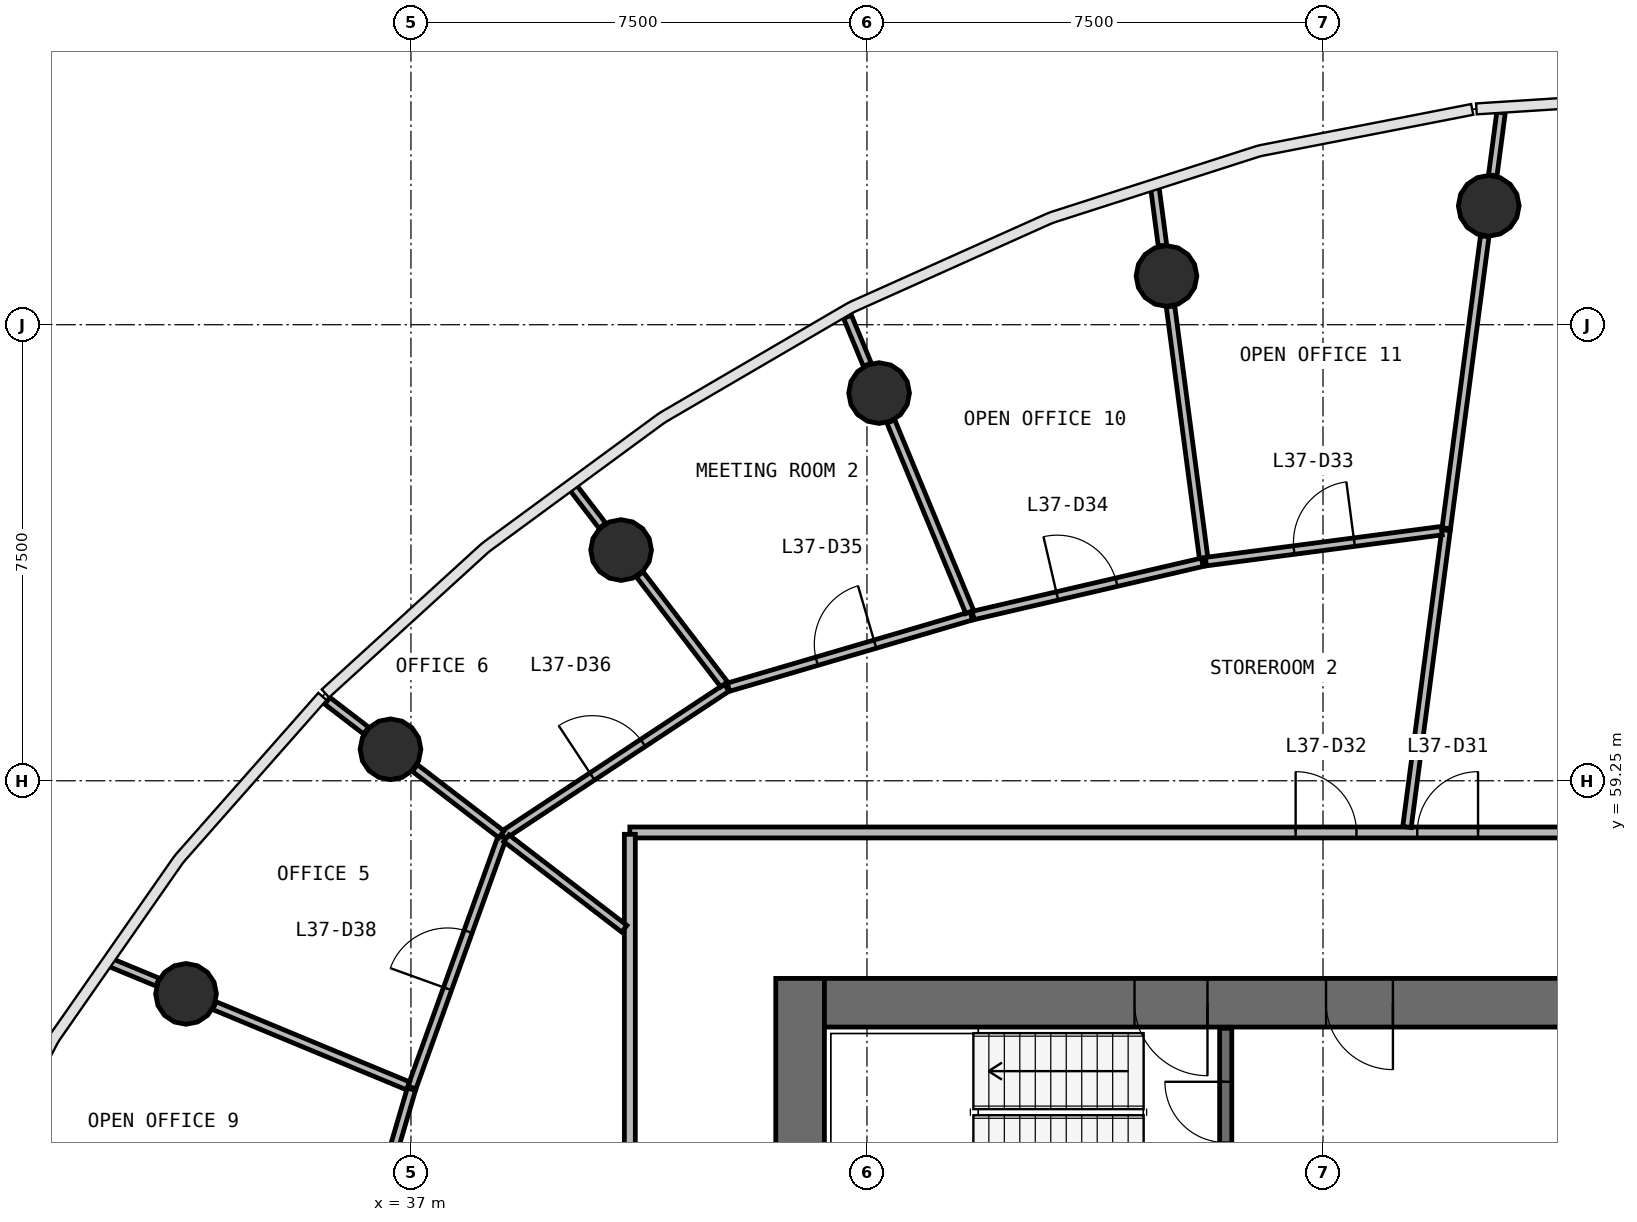
"""IFC4 building model, lengths in metres.
Left out: names, types, materials, properties, quantities, classifications, styles, units other than length and angle.
Written with IfcOpenShell. Run it as: python <this file> out.ifc"""

import sys

from ifc_helpers import new_model, si_unit, direction, frame, frame_2d, origin, origin_2d, place, context, subcontext, project, spatial, rectangle, circle, extrude, source, transform, mapped, element, fill, save


model = new_model("IFC4")
c1 = context("Model", 3, precision=1e-05, world=origin(), true_north=direction((0.0, 1.0)))
c2 = subcontext(c1, "Body", "Model", "MODEL_VIEW")
j1 = project(units=[si_unit("LENGTHUNIT", "METRE"), si_unit("PLANEANGLEUNIT", "RADIAN")], contexts=[c1])
p1 = place(None, origin())
s1 = spatial("IfcSite", under=j1, at=p1, CompositionType="ELEMENT")
p2 = place(p1, origin())
s2 = spatial("IfcBuilding", under=s1, at=p2, CompositionType="ELEMENT")
p3 = place(p2, frame((0.0, 0.0, 156.5)))
s3 = spatial("IfcBuildingStorey", under=s2, at=p3, CompositionType="ELEMENT", Elevation=156.5)
p4 = place(p3, frame((43.4, 56.0, 0.0), z_axis=(0.0, 0.0, 1.0), x_axis=(0.0, -1.0, 0.0)))
e1 = element("IfcWall", 1, at=p4, inside=s3, PredefinedType="SHEAR", context=c2, shape_type="SweptSolid", body=[
    extrude(rectangle(XDim=16.0, YDim=0.8, at=frame_2d((8.0, 0.0))), origin(), (0.0, 0.0, 1.0), 3.9),
])
p5 = place(p4, frame((7.1, 0.0, 0.0)))
e2 = element("IfcOpeningElement", 2, at=p5, cuts=e1, PredefinedType="OPENING", context=c2, shape_type="SweptSolid", body=[
    extrude(rectangle(XDim=1.8, YDim=2.1, at=frame_2d((0.9, 1.05))), frame((0.0, 0.41, 0.0), z_axis=(0.0, -1.0, 0.0), x_axis=(1.0, 0.0, 0.0)), (0.0, 0.0, 1.0), 0.82),
])
p6 = place(p3, frame((60.2, 55.6, 0.0), z_axis=(0.0, 0.0, 1.0), x_axis=(-1.0, 0.0, 0.0)))
e3 = element("IfcWall", 3, at=p6, inside=s3, PredefinedType="SHEAR", context=c2, shape_type="SweptSolid", body=[
    extrude(rectangle(XDim=16.4, YDim=0.8, at=frame_2d((8.2, 0.0))), origin(), (0.0, 0.0, 1.0), 3.9),
])
p7 = place(p6, frame((0.2, 0.0, 0.0)))
e4 = element("IfcOpeningElement", 4, at=p7, cuts=e3, PredefinedType="OPENING", context=c2, shape_type="SweptSolid", body=[
    extrude(rectangle(XDim=1.1, YDim=2.1, at=frame_2d((0.55, 1.05))), frame((0.0, 0.41, 0.0), z_axis=(0.0, -1.0, 0.0), x_axis=(1.0, 0.0, 0.0)), (0.0, 0.0, 1.0), 0.82),
])
p8 = place(p6, frame((10.1, 0.0, 0.0)))
e5 = element("IfcOpeningElement", 5, at=p8, cuts=e3, PredefinedType="OPENING", context=c2, shape_type="SweptSolid", body=[
    extrude(rectangle(XDim=1.2, YDim=2.1, at=frame_2d((0.6, 1.05))), frame((0.0, 0.41, 0.0), z_axis=(0.0, -1.0, 0.0), x_axis=(1.0, 0.0, 0.0)), (0.0, 0.0, 1.0), 0.82),
])
p9 = place(p6, frame((7.05, 0.0, 0.0)))
e6 = element("IfcOpeningElement", 6, at=p9, cuts=e3, PredefinedType="OPENING", context=c2, shape_type="SweptSolid", body=[
    extrude(rectangle(XDim=1.1, YDim=2.1, at=frame_2d((0.55, 1.05))), frame((0.0, 0.41, 0.0), z_axis=(0.0, -1.0, 0.0), x_axis=(1.0, 0.0, 0.0)), (0.0, 0.0, 1.0), 0.82),
])
m1 = source(origin(), c2, "Body", "SweptSolid", [
    extrude(circle(Radius=0.5, at=origin_2d()), origin(), (0.0, 0.0, 1.0), 3.9),
])
for number, where, z_axis, x_axis in (
    (7, (54.726, 68.705, 0.0), (0.0, 0.0, 1.0), (1.0, 0.0, 0.0)),
    (8, (49.426, 67.551, 0.0), (0.0, 0.0, 1.0), (1.0, 0.0, 0.0)),
    (9, (44.699, 65.626, 0.0), (0.0, 0.0, 1.0), (1.0, 0.0, 0.0)),
    (10, (40.456, 63.044, 0.0), (0.0, 0.0, 1.0), (1.0, 0.0, 0.0)),
    (11, (36.664, 59.768, 0.0), (0.0, 0.0, 1.0), (1.0, 0.0, 0.0)),
    (12, (33.301, 55.746, 0.0), (0.0, 0.0, 1.0), (1.0, 0.0, 0.0)),
):
    element("IfcColumn", number, at=place(p3, frame(where, z_axis=z_axis, x_axis=x_axis)), inside=s3, PredefinedType="COLUMN", context=c2, shape_type="MappedRepresentation", body=[
        mapped(m1, transform((0.0, 0.0, 0.0), scale=1.0)),
    ])
p10 = place(p3, frame((50.4, 52.43, 0.0), z_axis=(0.0, 0.0, 1.0), x_axis=(0.0, 1.0, 0.0)))
e13 = element("IfcWall", 13, at=p10, inside=s3, PredefinedType="SOLIDWALL", context=c2, shape_type="SweptSolid", body=[
    extrude(rectangle(XDim=2.75, YDim=0.2, at=frame_2d((1.375, 0.0))), origin(), (0.0, 0.0, 1.0), 3.58),
])
p11 = place(p10, frame((0.87, 0.0, 0.0)))
e14 = element("IfcOpeningElement", 14, at=p11, cuts=e13, PredefinedType="OPENING", context=c2, shape_type="SweptSolid", body=[
    extrude(rectangle(XDim=1.0, YDim=2.1, at=frame_2d((0.5, 1.05))), frame((0.0, 0.11, 0.0), z_axis=(0.0, -1.0, 0.0), x_axis=(1.0, 0.0, 0.0)), (0.0, 0.0, 1.0), 0.22),
])
p12 = place(p3, frame((40.6, 58.4, 0.0), z_axis=(0.0, 0.0, 1.0), x_axis=(1.0, 0.0, 0.0)))
e15 = element("IfcWall", 15, at=p12, inside=s3, PredefinedType="PARTITIONING", context=c2, shape_type="SweptSolid", body=[
    extrude(rectangle(XDim=22.8, YDim=0.18, at=frame_2d((11.4, 0.0))), origin(), (0.0, 0.0, 1.0), 2.88),
])
p13 = place(p12, frame((12.95, 0.0, 0.0)))
e16 = element("IfcOpeningElement", 16, at=p13, cuts=e15, PredefinedType="OPENING", context=c2, shape_type="SweptSolid", body=[
    extrude(rectangle(XDim=1.0, YDim=2.1, at=frame_2d((0.5, 1.05))), frame((0.0, 0.1, 0.0), z_axis=(0.0, -1.0, 0.0), x_axis=(1.0, 0.0, 0.0)), (0.0, 0.0, 1.0), 0.2),
])
p14 = place(p12, frame((10.95, 0.0, 0.0)))
e17 = element("IfcOpeningElement", 17, at=p14, cuts=e15, PredefinedType="OPENING", context=c2, shape_type="SweptSolid", body=[
    extrude(rectangle(XDim=1.0, YDim=2.1, at=frame_2d((0.5, 1.05))), frame((0.0, 0.1, 0.0), z_axis=(0.0, -1.0, 0.0), x_axis=(1.0, 0.0, 0.0)), (0.0, 0.0, 1.0), 0.2),
])
p15 = place(p3, frame((40.6, 37.63, 0.0), z_axis=(0.0, 0.0, 1.0), x_axis=(0.0, 1.0, 0.0)))
e18 = element("IfcWall", 18, at=p15, inside=s3, PredefinedType="PARTITIONING", context=c2, shape_type="SweptSolid", body=[
    extrude(rectangle(XDim=20.74, YDim=0.18, at=frame_2d((10.37, 0.0))), origin(), (0.0, 0.0, 1.0), 2.88),
])
p16 = place(p15, frame((9.89, 0.0, 0.0)))
e19 = element("IfcOpeningElement", 19, at=p16, cuts=e18, PredefinedType="OPENING", context=c2, shape_type="SweptSolid", body=[
    extrude(rectangle(XDim=1.0, YDim=2.1, at=frame_2d((0.5, 1.05))), frame((0.0, 0.1, 0.0), z_axis=(0.0, -1.0, 0.0), x_axis=(1.0, 0.0, 0.0)), (0.0, 0.0, 1.0), 0.2),
])
p17 = place(p15, frame((4.29, 0.0, 0.0)))
e20 = element("IfcOpeningElement", 20, at=p17, cuts=e18, PredefinedType="OPENING", context=c2, shape_type="SweptSolid", body=[
    extrude(rectangle(XDim=1.0, YDim=2.1, at=frame_2d((0.5, 1.05))), frame((0.0, 0.1, 0.0), z_axis=(0.0, -1.0, 0.0), x_axis=(1.0, 0.0, 0.0)), (0.0, 0.0, 1.0), 0.2),
])
p18 = place(p3, frame((53.381, 58.49, 0.0), z_axis=(0.0, 0.0, 1.0), x_axis=(0.130523758186, 0.991445181817, 0.0)))
e21 = element("IfcWall", 21, at=p18, inside=s3, PredefinedType="PARTITIONING", context=c2, shape_type="SweptSolid", body=[
    extrude(rectangle(XDim=4.925, YDim=0.14, at=frame_2d((2.462, 0.0))), origin(), (0.0, 0.0, 1.0), 2.88),
])
p19 = place(p3, frame((54.028, 63.402, 0.0), z_axis=(0.0, 0.0, 1.0), x_axis=(0.130532734851, 0.991443999998, 0.0)))
e22 = element("IfcWall", 22, at=p19, inside=s3, PredefinedType="PARTITIONING", context=c2, shape_type="SweptSolid", body=[
    extrude(rectangle(XDim=4.844, YDim=0.14, at=frame_2d((2.422, 0.0))), origin(), (0.0, 0.0, 1.0), 2.88),
])
p20 = place(p3, frame((38.511, 58.351, 0.0), z_axis=(0.0, 0.0, 1.0), x_axis=(0.834612459485, 0.550837582662, 0.0)))
e23 = element("IfcWall", 23, at=p20, inside=s3, PredefinedType="PARTITIONING", context=c2, shape_type="SweptSolid", body=[
    extrude(rectangle(XDim=4.412, YDim=0.14, at=frame_2d((2.206, 0.0))), origin(), (0.0, 0.0, 1.0), 2.88),
])
p21 = place(p20, frame((1.762, 0.0, 0.0)))
e24 = element("IfcOpeningElement", 24, at=p21, cuts=e23, PredefinedType="OPENING", context=c2, shape_type="SweptSolid", body=[
    extrude(rectangle(XDim=1.0, YDim=2.1, at=frame_2d((0.5, 1.05))), frame((0.0, 0.08, 0.0), z_axis=(0.0, -1.0, 0.0), x_axis=(1.0, 0.0, 0.0)), (0.0, 0.0, 1.0), 0.16),
])
p22 = place(p3, frame((37.016, 54.207, 0.0), z_axis=(0.0, 0.0, 1.0), x_axis=(0.339349662801, 0.940660303381, 0.0)))
e25 = element("IfcWall", 25, at=p22, inside=s3, PredefinedType="PARTITIONING", context=c2, shape_type="SweptSolid", body=[
    extrude(rectangle(XDim=4.376, YDim=0.14, at=frame_2d((2.188, 0.0))), origin(), (0.0, 0.0, 1.0), 2.88),
])
p23 = place(p22, frame((1.725, 0.0, 0.0)))
e26 = element("IfcOpeningElement", 26, at=p23, cuts=e25, PredefinedType="OPENING", context=c2, shape_type="SweptSolid", body=[
    extrude(rectangle(XDim=1.0, YDim=2.1, at=frame_2d((0.5, 1.05))), frame((0.0, 0.08, 0.0), z_axis=(0.0, -1.0, 0.0), x_axis=(1.0, 0.0, 0.0)), (0.0, 0.0, 1.0), 0.16),
])
p24 = place(p3, frame((35.826, 50.159, 0.0), z_axis=(0.0, 0.0, 1.0), x_axis=(0.28208743745, 0.959388699971, 0.0)))
e27 = element("IfcWall", 27, at=p24, inside=s3, PredefinedType="PARTITIONING", context=c2, shape_type="SweptSolid", body=[
    extrude(rectangle(XDim=4.189, YDim=0.14, at=frame_2d((2.094, 0.0))), origin(), (0.0, 0.0, 1.0), 2.88),
])
p25 = place(p24, frame((1.539, 0.0, 0.0)))
e28 = element("IfcOpeningElement", 28, at=p25, cuts=e27, PredefinedType="OPENING", context=c2, shape_type="SweptSolid", body=[
    extrude(rectangle(XDim=1.0, YDim=2.1, at=frame_2d((0.5, 1.05))), frame((0.0, 0.08, 0.0), z_axis=(0.0, -1.0, 0.0), x_axis=(1.0, 0.0, 0.0)), (0.0, 0.0, 1.0), 0.16),
])
p26 = place(p3, frame((50.045, 62.85, 0.0), z_axis=(0.0, 0.0, 1.0), x_axis=(-0.130506679213, 0.991447430115, 0.0)))
e29 = element("IfcWall", 29, at=p26, inside=s3, PredefinedType="PARTITIONING", context=c2, shape_type="SweptSolid", body=[
    extrude(rectangle(XDim=4.237, YDim=0.14, at=frame_2d((2.119, 0.0))), origin(), (0.0, 0.0, 1.0), 2.88),
])
p27 = place(p3, frame((42.222, 60.789, 0.0), z_axis=(0.0, 0.0, 1.0), x_axis=(0.959559478974, 0.281505961415, 0.0)))
e30 = element("IfcWall", 30, at=p27, inside=s3, PredefinedType="PARTITIONING", context=c2, shape_type="SweptSolid", body=[
    extrude(rectangle(XDim=4.164, YDim=0.14, at=frame_2d((2.082, 0.0))), origin(), (0.0, 0.0, 1.0), 2.88),
])
p28 = place(p27, frame((1.514, 0.0, 0.0)))
e31 = element("IfcOpeningElement", 31, at=p28, cuts=e30, PredefinedType="OPENING", context=c2, shape_type="SweptSolid", body=[
    extrude(rectangle(XDim=1.0, YDim=2.1, at=frame_2d((0.5, 1.05))), frame((0.0, 0.08, 0.0), z_axis=(0.0, -1.0, 0.0), x_axis=(1.0, 0.0, 0.0)), (0.0, 0.0, 1.0), 0.16),
])
p29 = place(p3, frame((50.075, 62.854, 0.0), z_axis=(0.0, 0.0, 1.0), x_axis=(0.991491442794, 0.130171882012, 0.0)))
e32 = element("IfcWall", 32, at=p29, inside=s3, PredefinedType="PARTITIONING", context=c2, shape_type="SweptSolid", body=[
    extrude(rectangle(XDim=3.91, YDim=0.14, at=frame_2d((1.955, 0.0))), origin(), (0.0, 0.0, 1.0), 2.88),
])
p30 = place(p29, frame((1.461, 0.0, 0.0)))
e33 = element("IfcOpeningElement", 33, at=p30, cuts=e32, PredefinedType="OPENING", context=c2, shape_type="SweptSolid", body=[
    extrude(rectangle(XDim=1.0, YDim=2.1, at=frame_2d((0.5, 1.05))), frame((0.0, 0.08, 0.0), z_axis=(0.0, -1.0, 0.0), x_axis=(1.0, 0.0, 0.0)), (0.0, 0.0, 1.0), 0.16),
])
p31 = place(p3, frame((46.246, 61.968, 0.0), z_axis=(0.0, 0.0, 1.0), x_axis=(0.974087273118, 0.226172465941, 0.0)))
e34 = element("IfcWall", 34, at=p31, inside=s3, PredefinedType="PARTITIONING", context=c2, shape_type="SweptSolid", body=[
    extrude(rectangle(XDim=3.87, YDim=0.14, at=frame_2d((1.935, 0.0))), origin(), (0.0, 0.0, 1.0), 2.88),
])
p32 = place(p31, frame((1.42, 0.0, 0.0)))
e35 = element("IfcOpeningElement", 35, at=p32, cuts=e34, PredefinedType="OPENING", context=c2, shape_type="SweptSolid", body=[
    extrude(rectangle(XDim=1.0, YDim=2.1, at=frame_2d((0.5, 1.05))), frame((0.0, 0.08, 0.0), z_axis=(0.0, -1.0, 0.0), x_axis=(1.0, 0.0, 0.0)), (0.0, 0.0, 1.0), 0.16),
])
p33 = place(p3, frame((36.951, 54.233, 0.0), z_axis=(0.0, 0.0, 1.0), x_axis=(-0.923873497733, 0.382698001285, 0.0)))
e36 = element("IfcWall", 36, at=p33, inside=s3, PredefinedType="PARTITIONING", context=c2, shape_type="SweptSolid", body=[
    extrude(rectangle(XDim=3.446, YDim=0.14, at=frame_2d((1.723, 0.0))), origin(), (0.0, 0.0, 1.0), 2.88),
])
p34 = place(p3, frame((46.19, 62.027, 0.0), z_axis=(0.0, 0.0, 1.0), x_axis=(-0.382697308523, 0.923873784696, 0.0)))
e37 = element("IfcWall", 37, at=p34, inside=s3, PredefinedType="PARTITIONING", context=c2, shape_type="SweptSolid", body=[
    extrude(rectangle(XDim=3.391, YDim=0.14, at=frame_2d((1.695, 0.0))), origin(), (0.0, 0.0, 1.0), 2.88),
])
p35 = place(p3, frame((40.51, 56.817, 0.0), z_axis=(0.0, 0.0, 1.0), x_axis=(-0.793387804713, 0.608716511467, 0.0)))
e38 = element("IfcWall", 38, at=p35, inside=s3, PredefinedType="PARTITIONING", context=c2, shape_type="SweptSolid", body=[
    extrude(rectangle(XDim=2.446, YDim=0.14, at=frame_2d((1.223, 0.0))), origin(), (0.0, 0.0, 1.0), 2.88),
])
p36 = place(p3, frame((42.15, 60.836, 0.0), z_axis=(0.0, 0.0, 1.0), x_axis=(-0.608757629388, 0.793356255828, 0.0)))
e39 = element("IfcWall", 39, at=p36, inside=s3, PredefinedType="PARTITIONING", context=c2, shape_type="SweptSolid", body=[
    extrude(rectangle(XDim=2.279, YDim=0.14, at=frame_2d((1.139, 0.0))), origin(), (0.0, 0.0, 1.0), 2.88),
])
p37 = place(p3, frame((38.487, 58.369, 0.0), z_axis=(0.0, 0.0, 1.0), x_axis=(-0.793336842099, 0.608782929269, 0.0)))
e40 = element("IfcWall", 40, at=p37, inside=s3, PredefinedType="PARTITIONING", context=c2, shape_type="SweptSolid", body=[
    extrude(rectangle(XDim=1.794, YDim=0.14, at=frame_2d((0.897, 0.0))), origin(), (0.0, 0.0, 1.0), 2.88),
])
p38 = place(p3, frame((54.792, 69.205, 0.0), z_axis=(0.0, 0.0, 1.0), x_axis=(0.130569518357, 0.991439156417, 0.0)))
e41 = element("IfcWall", 41, at=p38, inside=s3, PredefinedType="PARTITIONING", context=c2, shape_type="SweptSolid", body=[
    extrude(rectangle(XDim=1.043, YDim=0.14, at=frame_2d((0.522, 0.0))), origin(), (0.0, 0.0, 1.0), 2.88),
])
p39 = place(p3, frame((49.36, 68.052, 0.0), z_axis=(0.0, 0.0, 1.0), x_axis=(-0.130434626054, 0.991456911987, 0.0)))
e42 = element("IfcWall", 42, at=p39, inside=s3, PredefinedType="PARTITIONING", context=c2, shape_type="SweptSolid", body=[
    extrude(rectangle(XDim=0.953, YDim=0.14, at=frame_2d((0.476, 0.0))), origin(), (0.0, 0.0, 1.0), 2.88),
])
p40 = place(p3, frame((44.506, 66.092, 0.0), z_axis=(0.0, 0.0, 1.0), x_axis=(-0.382722863119, 0.923863198772, 0.0)))
e43 = element("IfcWall", 43, at=p40, inside=s3, PredefinedType="PARTITIONING", context=c2, shape_type="SweptSolid", body=[
    extrude(rectangle(XDim=0.852, YDim=0.14, at=frame_2d((0.426, 0.0))), origin(), (0.0, 0.0, 1.0), 2.88),
])
p41 = place(p3, frame((32.834, 55.939, 0.0), z_axis=(0.0, 0.0, 1.0), x_axis=(-0.923909393783, 0.382611332921, 0.0)))
e44 = element("IfcWall", 44, at=p41, inside=s3, PredefinedType="PARTITIONING", context=c2, shape_type="SweptSolid", body=[
    extrude(rectangle(XDim=0.831, YDim=0.14, at=frame_2d((0.416, 0.0))), origin(), (0.0, 0.0, 1.0), 2.88),
])
p42 = place(p3, frame((36.263, 60.075, 0.0), z_axis=(0.0, 0.0, 1.0), x_axis=(-0.793425360376, 0.608667559109, 0.0)))
e45 = element("IfcWall", 45, at=p42, inside=s3, PredefinedType="PARTITIONING", context=c2, shape_type="SweptSolid", body=[
    extrude(rectangle(XDim=0.803, YDim=0.14, at=frame_2d((0.402, 0.0))), origin(), (0.0, 0.0, 1.0), 2.88),
])
p43 = place(p3, frame((40.149, 63.445, 0.0), z_axis=(0.0, 0.0, 1.0), x_axis=(-0.608659697441, 0.793431391307, 0.0)))
e46 = element("IfcWall", 46, at=p43, inside=s3, PredefinedType="PARTITIONING", context=c2, shape_type="SweptSolid", body=[
    extrude(rectangle(XDim=0.786, YDim=0.14, at=frame_2d((0.393, 0.0))), origin(), (0.0, 0.0, 1.0), 2.88),
])
m2 = source(origin(), c2, "Body", "SweptSolid", [
    extrude(rectangle(XDim=1.2, YDim=2.1, at=frame_2d((0.6, 1.05))), frame((0.0, 0.025, 0.0), z_axis=(0.0, -1.0, 0.0), x_axis=(1.0, 0.0, 0.0)), (0.0, 0.0, 1.0), 0.05),
])
p44 = place(p8, origin())
e47 = element("IfcDoor", 47, at=p44, inside=s3, OperationType="SINGLE_SWING_LEFT", PredefinedType="DOOR", context=c2, shape_type="MappedRepresentation", body=[
    mapped(m2, transform((0.0, 0.0, 0.0), scale=1.0)),
])
fill(e5, e47)
m3 = source(origin(), c2, "Body", "SweptSolid", [
    extrude(rectangle(XDim=1.0, YDim=2.1, at=frame_2d((0.5, 1.05))), frame((0.0, 0.025, 0.0), z_axis=(0.0, -1.0, 0.0), x_axis=(1.0, 0.0, 0.0)), (0.0, 0.0, 1.0), 0.05),
])
p45 = place(p11, origin())
e48 = element("IfcDoor", 48, at=p45, inside=s3, OperationType="SINGLE_SWING_RIGHT", PredefinedType="DOOR", context=c2, shape_type="MappedRepresentation", body=[
    mapped(m3, transform((0.0, 0.0, 0.0), scale=1.0)),
])
fill(e14, e48)
m4 = source(origin(), c2, "Body", "SweptSolid", [
    extrude(rectangle(XDim=1.1, YDim=2.1, at=frame_2d((0.55, 1.05))), frame((0.0, 0.025, 0.0), z_axis=(0.0, -1.0, 0.0), x_axis=(1.0, 0.0, 0.0)), (0.0, 0.0, 1.0), 0.05),
])
p46 = place(p9, origin())
e49 = element("IfcDoor", 49, at=p46, inside=s3, OperationType="SINGLE_SWING_LEFT", PredefinedType="DOOR", context=c2, shape_type="MappedRepresentation", body=[
    mapped(m4, transform((0.0, 0.0, 0.0), scale=1.0)),
])
fill(e6, e49)
m5 = source(origin(), c2, "Body", "SweptSolid", [
    extrude(rectangle(XDim=1.0, YDim=2.1, at=frame_2d((0.5, 1.05))), frame((0.0, 0.025, 0.0), z_axis=(0.0, -1.0, 0.0), x_axis=(1.0, 0.0, 0.0)), (0.0, 0.0, 1.0), 0.05),
])
p47 = place(p13, origin())
e50 = element("IfcDoor", 50, at=p47, inside=s3, OperationType="SINGLE_SWING_RIGHT", PredefinedType="DOOR", context=c2, shape_type="MappedRepresentation", body=[
    mapped(m5, transform((0.0, 0.0, 0.0), scale=1.0)),
])
fill(e16, e50)
p48 = place(p14, origin())
e51 = element("IfcDoor", 51, at=p48, inside=s3, OperationType="SINGLE_SWING_LEFT", PredefinedType="DOOR", context=c2, shape_type="MappedRepresentation", body=[
    mapped(m5, transform((0.0, 0.0, 0.0), scale=1.0)),
])
fill(e17, e51)
p49 = place(p30, origin())
e52 = element("IfcDoor", 52, at=p49, inside=s3, OperationType="SINGLE_SWING_RIGHT", PredefinedType="DOOR", context=c2, shape_type="MappedRepresentation", body=[
    mapped(m5, transform((0.0, 0.0, 0.0), scale=1.0)),
])
fill(e33, e52)
p50 = place(p32, origin())
e53 = element("IfcDoor", 53, at=p50, inside=s3, OperationType="SINGLE_SWING_LEFT", PredefinedType="DOOR", context=c2, shape_type="MappedRepresentation", body=[
    mapped(m5, transform((0.0, 0.0, 0.0), scale=1.0)),
])
fill(e35, e53)
p51 = place(p28, origin())
e54 = element("IfcDoor", 54, at=p51, inside=s3, OperationType="SINGLE_SWING_RIGHT", PredefinedType="DOOR", context=c2, shape_type="MappedRepresentation", body=[
    mapped(m5, transform((0.0, 0.0, 0.0), scale=1.0)),
])
fill(e31, e54)
p52 = place(p21, origin())
e55 = element("IfcDoor", 55, at=p52, inside=s3, OperationType="SINGLE_SWING_LEFT", PredefinedType="DOOR", context=c2, shape_type="MappedRepresentation", body=[
    mapped(m5, transform((0.0, 0.0, 0.0), scale=1.0)),
])
fill(e24, e55)
p53 = place(p23, origin())
e56 = element("IfcDoor", 56, at=p53, inside=s3, OperationType="SINGLE_SWING_LEFT", PredefinedType="DOOR", context=c2, shape_type="MappedRepresentation", body=[
    mapped(m5, transform((0.0, 0.0, 0.0), scale=1.0)),
])
fill(e26, e56)
save(model, sys.argv[1])
